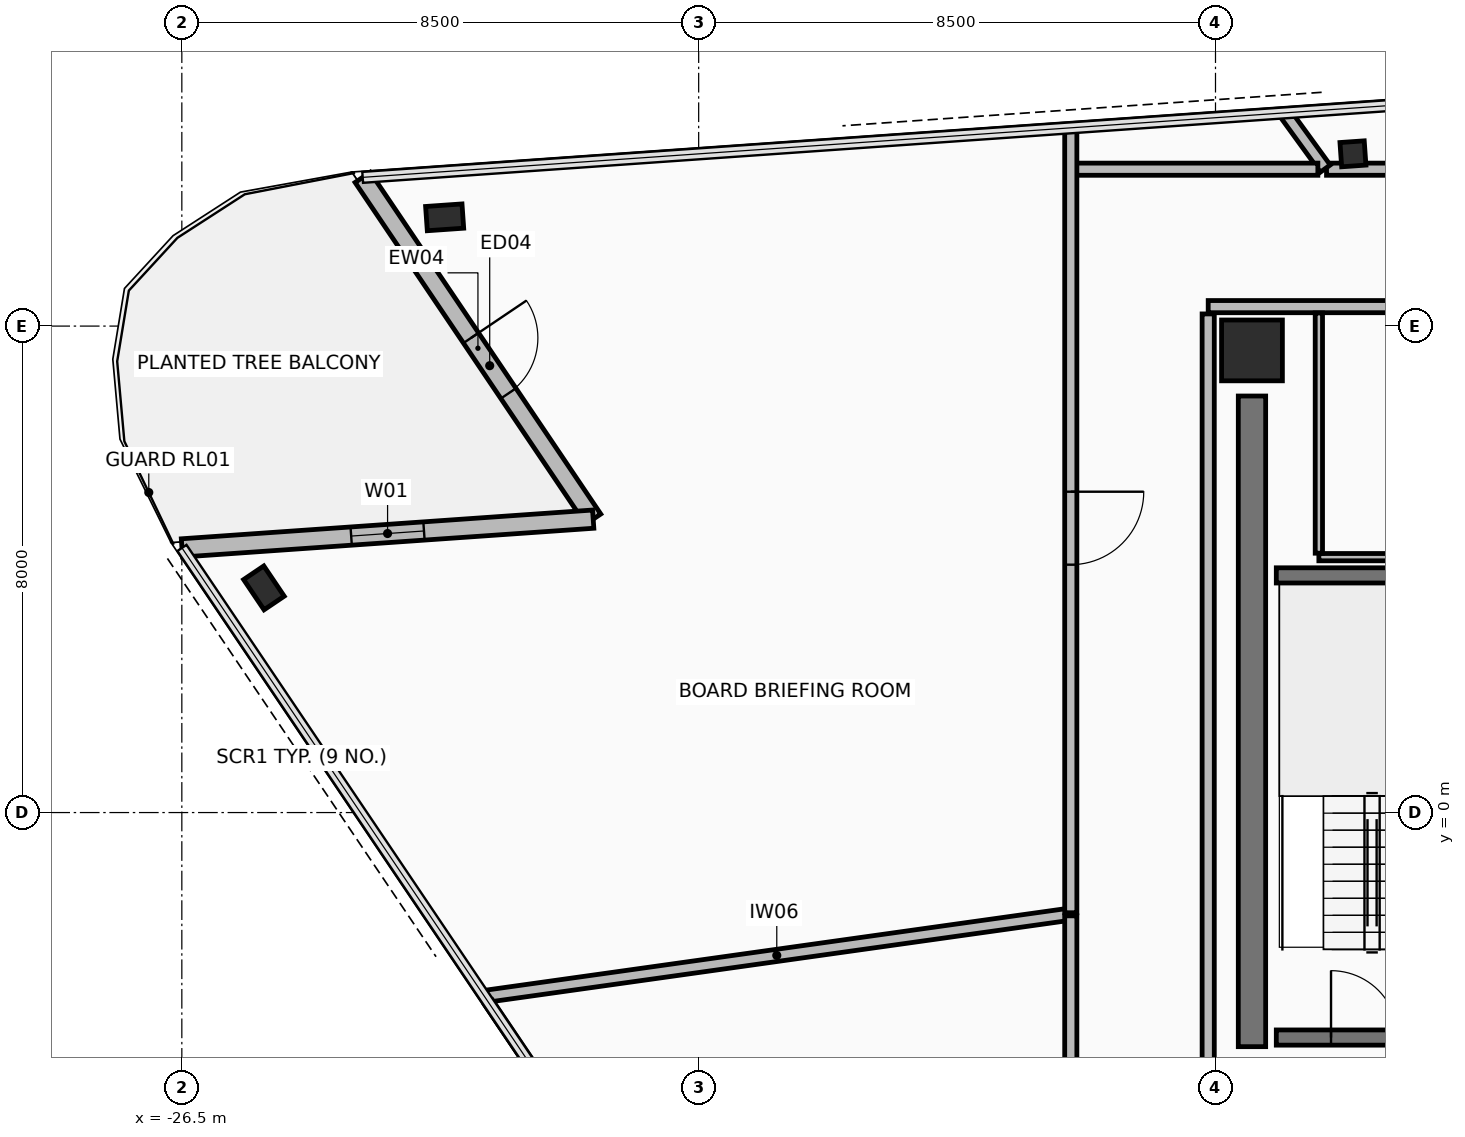
"""IFC4 building model, lengths in metres.
Left out: names, types, materials, properties, quantities, classifications, styles, units other than length and angle.
Written with IfcOpenShell. Run it as: python <this file> out.ifc"""

import sys

from ifc_helpers import new_model, si_unit, direction, frame, frame_2d, origin, origin_2d, place, context, subcontext, project, spatial, rectangle, hollow_rectangle, extrude, element, fill, save


model = new_model("IFC4")
c1 = context("Model", 3, precision=1e-05, world=origin(), true_north=direction((0.0, 1.0)))
c2 = subcontext(c1, "Body", "Model", "MODEL_VIEW")
j1 = project(units=[si_unit("LENGTHUNIT", "METRE"), si_unit("PLANEANGLEUNIT", "RADIAN")], contexts=[c1])
p1 = place(None, origin())
s1 = spatial("IfcSite", under=j1, at=p1, CompositionType="ELEMENT")
p2 = place(p1, origin())
s2 = spatial("IfcBuilding", under=s1, at=p2, CompositionType="ELEMENT")
p3 = place(p2, frame((0.0, 0.0, 257.0)))
s3 = spatial("IfcBuildingStorey", under=s2, at=p3, CompositionType="ELEMENT", Elevation=257.0)
p4 = place(p3, frame((-8.9, 7.6, 0.0), z_axis=(0.0, 0.0, 1.0), x_axis=(1.0, 0.0, 0.0)))
e1 = element("IfcColumn", 1, at=p4, inside=s3, PredefinedType="COLUMN", context=c2, shape_type="SweptSolid", body=[
    extrude(rectangle(XDim=1.0, YDim=1.0, at=origin_2d()), origin(), (0.0, 0.0, 1.0), 3.6),
])
p5 = place(p3, frame((-25.15, 3.695, 0.0), z_axis=(0.0, 0.0, 1.0), x_axis=(-0.559192903471, 0.829037572555, 0.0)))
e2 = element("IfcColumn", 2, at=p5, inside=s3, PredefinedType="COLUMN", context=c2, shape_type="SweptSolid", body=[
    extrude(hollow_rectangle(XDim=0.4, YDim=0.6, WallThickness=0.03, at=origin_2d()), origin(), (0.0, 0.0, 1.0), 3.6),
])
p6 = place(p3, frame((-7.24, 10.833, 0.0), z_axis=(0.0, 0.0, 1.0), x_axis=(0.99756392851, 0.069758214822, 0.0)))
e3 = element("IfcColumn", 3, at=p6, inside=s3, PredefinedType="COLUMN", context=c2, shape_type="SweptSolid", body=[
    extrude(hollow_rectangle(XDim=0.4, YDim=0.4, WallThickness=0.025, at=origin_2d()), origin(), (0.0, 0.0, 1.0), 3.6),
])
p7 = place(p3, frame((-22.177, 9.789, 0.0), z_axis=(0.0, 0.0, 1.0), x_axis=(0.99756392851, 0.069758214822, 0.0)))
e4 = element("IfcColumn", 4, at=p7, inside=s3, PredefinedType="COLUMN", context=c2, shape_type="SweptSolid", body=[
    extrude(hollow_rectangle(XDim=0.4, YDim=0.6, WallThickness=0.03, at=origin_2d()), origin(), (0.0, 0.0, 1.0), 3.6),
])
p8 = place(p3, frame((-23.526, 10.446, 0.0), z_axis=(0.0, 0.0, 1.0), x_axis=(0.559187716425, -0.829041071238, 0.0)))
e5 = element("IfcWall", 5, at=p8, inside=s3, PredefinedType="STANDARD", context=c2, shape_type="SweptSolid", body=[
    extrude(rectangle(XDim=6.78, YDim=0.3, at=frame_2d((3.39, 0.0))), origin(), (0.0, 0.0, 1.0), 2.765),
])
p9 = place(p8, frame((3.186, 0.0, 0.0)))
e6 = element("IfcOpeningElement", 6, at=p9, cuts=e5, PredefinedType="OPENING", context=c2, shape_type="SweptSolid", body=[
    extrude(rectangle(XDim=1.1, YDim=2.2, at=frame_2d((0.55, 1.1))), frame((0.0, 0.16, 0.0), z_axis=(0.0, -1.0, 0.0), x_axis=(1.0, 0.0, 0.0)), (0.0, 0.0, 1.0), 0.32),
])
p10 = place(p3, frame((-19.735, 4.825, 0.0), z_axis=(0.0, 0.0, 1.0), x_axis=(-0.997564507468, -0.06974993506, 0.0)))
e7 = element("IfcWall", 7, at=p10, inside=s3, PredefinedType="STANDARD", context=c2, shape_type="SweptSolid", body=[
    extrude(rectangle(XDim=6.78, YDim=0.3, at=frame_2d((3.39, 0.0))), origin(), (0.0, 0.0, 1.0), 2.765),
])
p11 = place(p10, frame((2.79, 0.0, 0.485)))
e8 = element("IfcOpeningElement", 8, at=p11, cuts=e7, PredefinedType="OPENING", context=c2, shape_type="SweptSolid", body=[
    extrude(rectangle(XDim=1.2, YDim=2.1, at=frame_2d((0.6, 1.05))), frame((0.0, 0.16, 0.0), z_axis=(0.0, -1.0, 0.0), x_axis=(1.0, 0.0, 0.0)), (0.0, 0.0, 1.0), 0.32),
])
p12 = place(p3, frame((-8.9, -3.85, 0.0), z_axis=(0.0, 0.0, 1.0), x_axis=(0.0, 1.0, 0.0)))
e9 = element("IfcWall", 9, at=p12, inside=s3, PredefinedType="SHEAR", context=c2, shape_type="SweptSolid", body=[
    extrude(rectangle(XDim=10.7, YDim=0.45, at=frame_2d((5.35, 0.0))), origin(), (0.0, 0.0, 1.0), 3.42),
])
p13 = place(p3, frame((9.62, 8.32, 0.0), z_axis=(0.0, 0.0, 1.0), x_axis=(-1.0, 0.0, 0.0)))
e10 = element("IfcWall", 10, at=p13, inside=s3, PredefinedType="PARTITIONING", context=c2, shape_type="SweptSolid", body=[
    extrude(rectangle(XDim=19.24, YDim=0.2, at=frame_2d((9.62, 0.0))), origin(), (0.0, 0.0, 1.0), 2.915),
])
p14 = place(p13, frame((10.97, 0.0, 0.0)))
e11 = element("IfcOpeningElement", 11, at=p14, cuts=e10, PredefinedType="OPENING", context=c2, shape_type="SweptSolid", body=[
    extrude(rectangle(XDim=0.9, YDim=2.1, at=frame_2d((0.45, 1.05))), frame((0.0, 0.11, 0.0), z_axis=(0.0, -1.0, 0.0), x_axis=(1.0, 0.0, 0.0)), (0.0, 0.0, 1.0), 0.22),
])
p15 = place(p13, frame((7.57, 0.0, 0.0)))
e12 = element("IfcOpeningElement", 12, at=p15, cuts=e10, PredefinedType="OPENING", context=c2, shape_type="SweptSolid", body=[
    extrude(rectangle(XDim=0.9, YDim=2.1, at=frame_2d((0.45, 1.05))), frame((0.0, 0.11, 0.0), z_axis=(0.0, -1.0, 0.0), x_axis=(1.0, 0.0, 0.0)), (0.0, 0.0, 1.0), 0.22),
])
p16 = place(p13, frame((15.02, 0.0, 0.0)))
e13 = element("IfcOpeningElement", 13, at=p16, cuts=e10, PredefinedType="OPENING", context=c2, shape_type="SweptSolid", body=[
    extrude(rectangle(XDim=0.9, YDim=2.1, at=frame_2d((0.45, 1.05))), frame((0.0, 0.11, 0.0), z_axis=(0.0, -1.0, 0.0), x_axis=(1.0, 0.0, 0.0)), (0.0, 0.0, 1.0), 0.22),
])
p17 = place(p3, frame((-9.62, 8.2, 0.0), z_axis=(0.0, 0.0, 1.0), x_axis=(0.0, -1.0, 0.0)))
e14 = element("IfcWall", 14, at=p17, inside=s3, PredefinedType="PARTITIONING", context=c2, shape_type="SweptSolid", body=[
    extrude(rectangle(XDim=16.4, YDim=0.2, at=frame_2d((8.2, 0.0))), origin(), (0.0, 0.0, 1.0), 2.765),
])
p18 = place(p17, frame((12.65, 0.0, 0.0)))
e15 = element("IfcOpeningElement", 15, at=p18, cuts=e14, PredefinedType="OPENING", context=c2, shape_type="SweptSolid", body=[
    extrude(rectangle(XDim=1.1, YDim=2.15, at=frame_2d((0.55, 1.075))), frame((0.0, 0.11, 0.0), z_axis=(0.0, -1.0, 0.0), x_axis=(1.0, 0.0, 0.0)), (0.0, 0.0, 1.0), 0.22),
])
p19 = place(p3, frame((-8.5, -3.7, 0.0), z_axis=(0.0, 0.0, 1.0), x_axis=(1.0, 0.0, 0.0)))
e16 = element("IfcWall", 16, at=p19, inside=s3, PredefinedType="SHEAR", context=c2, shape_type="SweptSolid", body=[
    extrude(rectangle(XDim=2.95, YDim=0.25, at=frame_2d((1.475, 0.0))), origin(), (0.0, 0.0, 1.0), 3.42),
])
p20 = place(p19, frame((0.9, 0.0, 0.0)))
e17 = element("IfcOpeningElement", 17, at=p20, cuts=e16, PredefinedType="OPENING", context=c2, shape_type="SweptSolid", body=[
    extrude(rectangle(XDim=1.1, YDim=2.15, at=frame_2d((0.55, 1.075))), frame((0.0, 0.135, 0.0), z_axis=(0.0, -1.0, 0.0), x_axis=(1.0, 0.0, 0.0)), (0.0, 0.0, 1.0), 0.27),
])
p21 = place(p3, frame((-8.5, 3.9, 0.0), z_axis=(0.0, 0.0, 1.0), x_axis=(1.0, 0.0, 0.0)))
e18 = element("IfcWall", 18, at=p21, inside=s3, PredefinedType="SHEAR", context=c2, shape_type="SweptSolid", body=[
    extrude(rectangle(XDim=2.95, YDim=0.25, at=frame_2d((1.475, 0.0))), origin(), (0.0, 0.0, 1.0), 3.42),
])
p22 = place(p3, frame((-7.8, 4.2, 0.0), z_axis=(0.0, 0.0, 1.0), x_axis=(1.0, 0.0, 0.0)))
e19 = element("IfcWall", 19, at=p22, inside=s3, PredefinedType="PARTITIONING", context=c2, shape_type="SweptSolid", body=[
    extrude(rectangle(XDim=3.9, YDim=0.12, at=frame_2d((1.95, 0.0))), origin(), (0.0, 0.0, 1.0), 3.42),
])
p23 = place(p3, frame((-7.8, 8.215, 0.0), z_axis=(0.0, 0.0, 1.0), x_axis=(0.0, -1.0, 0.0)))
e20 = element("IfcWall", 20, at=p23, inside=s3, PredefinedType="PARTITIONING", context=c2, shape_type="SweptSolid", body=[
    extrude(rectangle(XDim=3.95, YDim=0.12, at=frame_2d((1.975, 0.0))), origin(), (0.0, 0.0, 1.0), 2.715),
])
p24 = place(p3, frame((-21.522, -3.025, 0.0), z_axis=(0.0, 0.0, 1.0), x_axis=(0.990265354778, 0.13919241045, 0.0)))
e21 = element("IfcWall", 21, at=p24, inside=s3, PredefinedType="PARTITIONING", context=c2, shape_type="SweptSolid", body=[
    extrude(rectangle(XDim=9.708, YDim=0.2, at=frame_2d((4.854, 0.0))), origin(), (0.0, 0.0, 1.0), 2.765),
])
p25 = place(p3, frame((-11.88, -1.698, 0.0), z_axis=(0.0, 0.0, 1.0), x_axis=(0.0, -1.0, 0.0)))
e22 = element("IfcWall", 22, at=p25, inside=s3, PredefinedType="PARTITIONING", context=c2, shape_type="SweptSolid", body=[
    extrude(rectangle(XDim=8.881, YDim=0.2, at=frame_2d((4.44, 0.0))), origin(), (0.0, 0.0, 1.0), 2.915),
])
p26 = place(p25, frame((4.016, 0.0, 0.0)))
e23 = element("IfcOpeningElement", 23, at=p26, cuts=e22, PredefinedType="OPENING", context=c2, shape_type="SweptSolid", body=[
    extrude(rectangle(XDim=0.85, YDim=2.1, at=frame_2d((0.425, 1.05))), frame((0.0, 0.11, 0.0), z_axis=(0.0, -1.0, 0.0), x_axis=(1.0, 0.0, 0.0)), (0.0, 0.0, 1.0), 0.22),
])
p27 = place(p3, frame((-8.331, -22.582, 0.0), z_axis=(0.0, 0.0, 1.0), x_axis=(-0.559190048569, 0.829039498203, 0.0)))
e24 = element("IfcWall", 24, at=p27, inside=s3, PredefinedType="PARTITIONING", context=c2, shape_type="SweptSolid", body=[
    extrude(rectangle(XDim=23.473, YDim=0.15, at=frame_2d((11.737, 0.0))), origin(), (0.0, 0.0, 1.0), 3.42),
])
p28 = place(p3, frame((5.145, 10.58, 0.0), z_axis=(0.0, 0.0, 1.0), x_axis=(-1.0, 0.0, 0.0)))
e25 = element("IfcWall", 25, at=p28, inside=s3, PredefinedType="PARTITIONING", context=c2, shape_type="SweptSolid", body=[
    extrude(rectangle(XDim=12.819, YDim=0.2, at=frame_2d((6.409, 0.0))), origin(), (0.0, 0.0, 1.0), 2.765),
])
p29 = place(p28, frame((5.909, 0.0, 0.0)))
e26 = element("IfcOpeningElement", 26, at=p29, cuts=e25, PredefinedType="OPENING", context=c2, shape_type="SweptSolid", body=[
    extrude(rectangle(XDim=1.0, YDim=2.15, at=frame_2d((0.5, 1.075))), frame((0.0, 0.11, 0.0), z_axis=(0.0, -1.0, 0.0), x_axis=(1.0, 0.0, 0.0)), (0.0, 0.0, 1.0), 0.22),
])
p30 = place(p3, frame((-7.694, 10.59, 0.0), z_axis=(0.0, 0.0, 1.0), x_axis=(-0.587825586486, 0.808987688332, 0.0)))
e27 = element("IfcWall", 27, at=p30, inside=s3, PredefinedType="PARTITIONING", context=c2, shape_type="SweptSolid", body=[
    extrude(rectangle(XDim=1.133, YDim=0.2, at=frame_2d((0.566, 0.0))), origin(), (0.0, 0.0, 1.0), 2.765),
])
p31 = place(p3, frame((-7.817, 10.58, 0.0), z_axis=(0.0, 0.0, 1.0), x_axis=(-1.0, 0.0, 0.0)))
e28 = element("IfcWall", 28, at=p31, inside=s3, PredefinedType="PARTITIONING", context=c2, shape_type="SweptSolid", body=[
    extrude(rectangle(XDim=4.063, YDim=0.2, at=frame_2d((2.031, 0.0))), origin(), (0.0, 0.0, 1.0), 2.765),
])
p32 = place(p3, frame((-11.88, 11.26, 0.0), z_axis=(0.0, 0.0, 1.0), x_axis=(0.0, -1.0, 0.0)))
e29 = element("IfcWall", 29, at=p32, inside=s3, PredefinedType="PARTITIONING", context=c2, shape_type="SweptSolid", body=[
    extrude(rectangle(XDim=12.908, YDim=0.2, at=frame_2d((6.454, 0.0))), origin(), (0.0, 0.0, 1.0), 2.765),
])
p33 = place(p32, frame((5.984, 0.0, 0.0)))
e30 = element("IfcOpeningElement", 30, at=p33, cuts=e29, PredefinedType="OPENING", context=c2, shape_type="SweptSolid", body=[
    extrude(rectangle(XDim=1.2, YDim=2.15, at=frame_2d((0.6, 1.075))), frame((0.0, 0.11, 0.0), z_axis=(0.0, -1.0, 0.0), x_axis=(1.0, 0.0, 0.0)), (0.0, 0.0, 1.0), 0.22),
])
p34 = place(p9, origin())
e31 = element("IfcDoor", 31, at=p34, inside=s3, OperationType="SINGLE_SWING_LEFT", PredefinedType="DOOR", context=c2, shape_type="SweptSolid", body=[
    extrude(rectangle(XDim=1.1, YDim=2.2, at=frame_2d((0.55, 1.1))), frame((0.0, 0.025, 0.0), z_axis=(0.0, -1.0, 0.0), x_axis=(1.0, 0.0, 0.0)), (0.0, 0.0, 1.0), 0.05),
])
fill(e6, e31)
p35 = place(p11, origin())
e32 = element("IfcWindow", 32, at=p35, inside=s3, PartitioningType="SINGLE_PANEL", PredefinedType="WINDOW", context=c2, shape_type="SweptSolid", body=[
    extrude(rectangle(XDim=1.2, YDim=2.1, at=frame_2d((0.6, 1.05))), frame((0.0, 0.03, 0.0), z_axis=(0.0, -1.0, 0.0), x_axis=(1.0, 0.0, 0.0)), (0.0, 0.0, 1.0), 0.06),
])
fill(e8, e32)
p36 = place(p20, origin())
e33 = element("IfcDoor", 33, at=p36, inside=s3, OperationType="SINGLE_SWING_LEFT", PredefinedType="DOOR", context=c2, shape_type="SweptSolid", body=[
    extrude(rectangle(XDim=1.1, YDim=2.15, at=frame_2d((0.55, 1.075))), frame((0.0, 0.025, 0.0), z_axis=(0.0, -1.0, 0.0), x_axis=(1.0, 0.0, 0.0)), (0.0, 0.0, 1.0), 0.05),
])
fill(e17, e33)
p37 = place(p33, origin())
e34 = element("IfcDoor", 34, at=p37, inside=s3, OperationType="SINGLE_SWING_LEFT", PredefinedType="DOOR", context=c2, shape_type="SweptSolid", body=[
    extrude(rectangle(XDim=1.2, YDim=2.15, at=frame_2d((0.6, 1.075))), frame((0.0, 0.025, 0.0), z_axis=(0.0, -1.0, 0.0), x_axis=(1.0, 0.0, 0.0)), (0.0, 0.0, 1.0), 0.05),
])
fill(e30, e34)
save(model, sys.argv[1])
